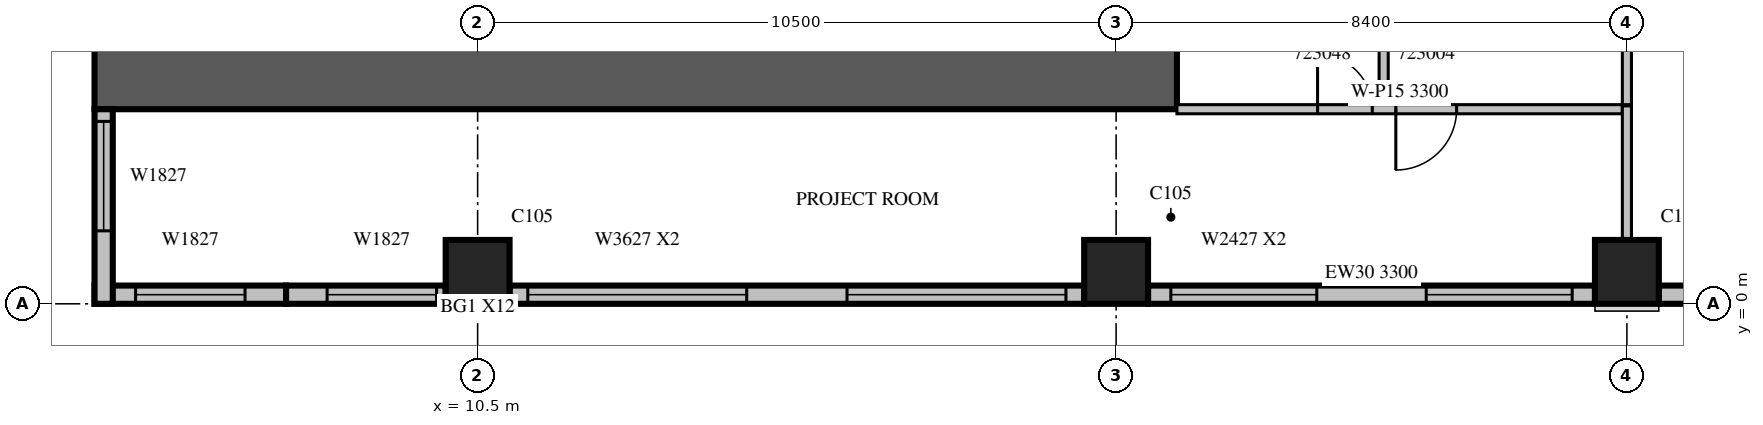
"""IFC4 building model, lengths in metres.
Left out: names, types, materials, properties, quantities, classifications, styles, units other than length and angle.
Written with IfcOpenShell. Run it as: python <this file> out.ifc"""

import sys

from ifc_helpers import new_model, si_unit, direction, frame, frame_2d, origin, origin_2d, place, context, subcontext, project, spatial, rectangle, extrude, source, transform, mapped, element, fill, save


model = new_model("IFC4")
c1 = context("Model", 3, precision=1e-05, world=origin(), true_north=direction((0.0, 1.0)))
c2 = subcontext(c1, "Body", "Model", "MODEL_VIEW")
j1 = project(units=[si_unit("LENGTHUNIT", "METRE"), si_unit("PLANEANGLEUNIT", "RADIAN")], contexts=[c1])
p1 = place(None, origin())
s1 = spatial("IfcSite", under=j1, at=p1, CompositionType="ELEMENT")
p2 = place(p1, origin())
s2 = spatial("IfcBuilding", under=s1, at=p2, CompositionType="ELEMENT")
p3 = place(p2, frame((0.0, 0.0, 107.7)))
s3 = spatial("IfcBuildingStorey", under=s2, at=p3, CompositionType="ELEMENT", Elevation=107.7)
m1 = source(origin(), c2, "Body", "SweptSolid", [
    extrude(rectangle(XDim=1.05, YDim=1.05, at=origin_2d()), origin(), (0.0, 0.0, 1.0), 4.2),
])
for number, where, z_axis, x_axis in (
    (1, (10.5, 0.525, 0.0), (0.0, 0.0, 1.0), (1.0, 0.0, 0.0)),
    (2, (21.0, 0.525, 0.0), (0.0, 0.0, 1.0), (1.0, 0.0, 0.0)),
    (3, (29.4, 0.525, 0.0), (0.0, 0.0, 1.0), (1.0, 0.0, 0.0)),
):
    element("IfcColumn", number, at=place(p3, frame(where, z_axis=z_axis, x_axis=x_axis)), inside=s3, PredefinedType="COLUMN", context=c2, shape_type="MappedRepresentation", body=[
        mapped(m1, transform((0.0, 0.0, 0.0), scale=1.0)),
    ])
m2 = source(origin(), c2, "Body", "SweptSolid", [
    extrude(rectangle(XDim=17.8, YDim=1.0, at=frame_2d((8.9, 0.0))), origin(), (0.0, 0.0, 1.0), 4.2),
])
p4 = place(p3, frame((4.2, 3.7, 0.0), z_axis=(0.0, 0.0, 1.0), x_axis=(1.0, 0.0, 0.0)))
e4 = element("IfcWall", 4, at=p4, inside=s3, PredefinedType="SHEAR", context=c2, shape_type="MappedRepresentation", body=[
    mapped(m2, transform((0.0, 0.0, 0.0), scale=1.0)),
])
m3 = source(origin(), c2, "Body", "SweptSolid", [
    extrude(rectangle(XDim=3.15, YDim=0.3, at=frame_2d((1.575, 0.0))), origin(), (0.0, 0.0, 1.0), 3.8),
])
p5 = place(p3, frame((4.2, 0.15, 0.0), z_axis=(0.0, 0.0, 1.0), x_axis=(1.0, 0.0, 0.0)))
e5 = element("IfcWall", 5, at=p5, inside=s3, PredefinedType="STANDARD", context=c2, shape_type="MappedRepresentation", body=[
    mapped(m3, transform((0.0, 0.0, 0.0), scale=1.0)),
])
m4 = source(origin(), c2, "Body", "SweptSolid", [
    extrude(rectangle(XDim=1.8, YDim=2.7, at=frame_2d((0.9, 1.35))), frame((0.0, 0.16, 0.0), z_axis=(0.0, -1.0, 0.0), x_axis=(1.0, 0.0, 0.0)), (0.0, 0.0, 1.0), 0.32),
])
p6 = place(p5, frame((0.675, 0.0, 0.6)))
e6 = element("IfcOpeningElement", 6, at=p6, cuts=e5, PredefinedType="OPENING", context=c2, shape_type="MappedRepresentation", body=[
    mapped(m4, transform((0.0, 0.0, 0.0), scale=1.0)),
])
p7 = place(p3, frame((7.35, 0.15, 0.0), z_axis=(0.0, 0.0, 1.0), x_axis=(1.0, 0.0, 0.0)))
e7 = element("IfcWall", 7, at=p7, inside=s3, PredefinedType="STANDARD", context=c2, shape_type="SweptSolid", body=[
    extrude(rectangle(XDim=2.625, YDim=0.3, at=frame_2d((1.312, 0.0))), origin(), (0.0, 0.0, 1.0), 3.8),
])
p8 = place(p7, frame((0.675, 0.0, 0.6)))
e8 = element("IfcOpeningElement", 8, at=p8, cuts=e7, PredefinedType="OPENING", context=c2, shape_type="MappedRepresentation", body=[
    mapped(m4, transform((0.0, 0.0, 0.0), scale=1.0)),
])
p9 = place(p3, frame((11.025, 0.15, 0.0), z_axis=(0.0, 0.0, 1.0), x_axis=(1.0, 0.0, 0.0)))
e9 = element("IfcWall", 9, at=p9, inside=s3, PredefinedType="STANDARD", context=c2, shape_type="SweptSolid", body=[
    extrude(rectangle(XDim=9.45, YDim=0.3, at=frame_2d((4.725, 0.0))), origin(), (0.0, 0.0, 1.0), 3.8),
])
m5 = source(origin(), c2, "Body", "SweptSolid", [
    extrude(rectangle(XDim=3.6, YDim=2.7, at=frame_2d((1.8, 1.35))), frame((0.0, 0.16, 0.0), z_axis=(0.0, -1.0, 0.0), x_axis=(1.0, 0.0, 0.0)), (0.0, 0.0, 1.0), 0.32),
])
p10 = place(p9, frame((0.3, 0.0, 0.6)))
e10 = element("IfcOpeningElement", 10, at=p10, cuts=e9, PredefinedType="OPENING", context=c2, shape_type="MappedRepresentation", body=[
    mapped(m5, transform((0.0, 0.0, 0.0), scale=1.0)),
])
p11 = place(p9, frame((5.55, 0.0, 0.6)))
e11 = element("IfcOpeningElement", 11, at=p11, cuts=e9, PredefinedType="OPENING", context=c2, shape_type="MappedRepresentation", body=[
    mapped(m5, transform((0.0, 0.0, 0.0), scale=1.0)),
])
m6 = source(origin(), c2, "Body", "SweptSolid", [
    extrude(rectangle(XDim=7.35, YDim=0.3, at=frame_2d((3.675, 0.0))), origin(), (0.0, 0.0, 1.0), 3.3),
])
p12 = place(p3, frame((21.525, 0.15, 0.0), z_axis=(0.0, 0.0, 1.0), x_axis=(1.0, 0.0, 0.0)))
e12 = element("IfcWall", 12, at=p12, inside=s3, PredefinedType="STANDARD", context=c2, shape_type="MappedRepresentation", body=[
    mapped(m6, transform((0.0, 0.0, 0.0), scale=1.0)),
])
m7 = source(origin(), c2, "Body", "SweptSolid", [
    extrude(rectangle(XDim=2.4, YDim=2.7, at=frame_2d((1.2, 1.35))), frame((0.0, 0.16, 0.0), z_axis=(0.0, -1.0, 0.0), x_axis=(1.0, 0.0, 0.0)), (0.0, 0.0, 1.0), 0.32),
])
p13 = place(p12, frame((0.375, 0.0, 0.6)))
e13 = element("IfcOpeningElement", 13, at=p13, cuts=e12, PredefinedType="OPENING", context=c2, shape_type="MappedRepresentation", body=[
    mapped(m7, transform((0.0, 0.0, 0.0), scale=1.0)),
])
p14 = place(p12, frame((4.575, 0.0, 0.6)))
e14 = element("IfcOpeningElement", 14, at=p14, cuts=e12, PredefinedType="OPENING", context=c2, shape_type="MappedRepresentation", body=[
    mapped(m7, transform((0.0, 0.0, 0.0), scale=1.0)),
])
m8 = source(origin(), c2, "Body", "SweptSolid", [
    extrude(rectangle(XDim=7.35, YDim=0.3, at=frame_2d((3.675, 0.0))), origin(), (0.0, 0.0, 1.0), 3.8),
])
p15 = place(p3, frame((29.925, 0.15, 0.0), z_axis=(0.0, 0.0, 1.0), x_axis=(1.0, 0.0, 0.0)))
e15 = element("IfcWall", 15, at=p15, inside=s3, PredefinedType="STANDARD", context=c2, shape_type="MappedRepresentation", body=[
    mapped(m8, transform((0.0, 0.0, 0.0), scale=1.0)),
])
m9 = source(origin(), c2, "Body", "SweptSolid", [
    extrude(rectangle(XDim=3.2, YDim=0.3, at=frame_2d((1.6, 0.0))), origin(), (0.0, 0.0, 1.0), 3.8),
])
p16 = place(p3, frame((4.35, 3.2, 0.0), z_axis=(0.0, 0.0, 1.0), x_axis=(0.0, -1.0, 0.0)))
e16 = element("IfcWall", 16, at=p16, inside=s3, PredefinedType="STANDARD", context=c2, shape_type="MappedRepresentation", body=[
    mapped(m9, transform((0.0, 0.0, 0.0), scale=1.0)),
])
p17 = place(p16, frame((0.2, 0.0, 0.6)))
e17 = element("IfcOpeningElement", 17, at=p17, cuts=e16, PredefinedType="OPENING", context=c2, shape_type="MappedRepresentation", body=[
    mapped(m4, transform((0.0, 0.0, 0.0), scale=1.0)),
])
p18 = place(p3, frame((25.4, 14.7, 0.0), z_axis=(0.0, 0.0, 1.0), x_axis=(0.0, -1.0, 0.0)))
e18 = element("IfcWall", 18, at=p18, inside=s3, PredefinedType="PARTITIONING", context=c2, shape_type="SweptSolid", body=[
    extrude(rectangle(XDim=11.425, YDim=0.15, at=frame_2d((5.713, 0.0))), origin(), (0.0, 0.0, 1.0), 2.8),
])
m10 = source(origin(), c2, "Body", "SweptSolid", [
    extrude(rectangle(XDim=0.9, YDim=2.1, at=frame_2d((0.45, 1.05))), frame((0.0, 0.085, 0.0), z_axis=(0.0, -1.0, 0.0), x_axis=(1.0, 0.0, 0.0)), (0.0, 0.0, 1.0), 0.17),
])
p19 = place(p18, frame((6.763, 0.0, 0.0)))
e19 = element("IfcOpeningElement", 19, at=p19, cuts=e18, PredefinedType="OPENING", context=c2, shape_type="MappedRepresentation", body=[
    mapped(m10, transform((0.0, 0.0, 0.0), scale=1.0)),
])
p20 = place(p18, frame((0.175, 0.0, 0.0)))
e20 = element("IfcOpeningElement", 20, at=p20, cuts=e18, PredefinedType="OPENING", context=c2, shape_type="MappedRepresentation", body=[
    mapped(m10, transform((0.0, 0.0, 0.0), scale=1.0)),
])
p21 = place(p3, frame((29.4, 3.275, 0.0), z_axis=(0.0, 0.0, 1.0), x_axis=(0.0, 1.0, 0.0)))
e21 = element("IfcWall", 21, at=p21, inside=s3, PredefinedType="PARTITIONING", context=c2, shape_type="SweptSolid", body=[
    extrude(rectangle(XDim=6.701, YDim=0.15, at=frame_2d((3.35, 0.0))), origin(), (0.0, 0.0, 1.0), 3.8),
])
p22 = place(p3, frame((22.0, 3.2, 0.0), z_axis=(0.0, 0.0, 1.0), x_axis=(1.0, 0.0, 0.0)))
e22 = element("IfcWall", 22, at=p22, inside=s3, PredefinedType="PARTITIONING", context=c2, shape_type="SweptSolid", body=[
    extrude(rectangle(XDim=7.325, YDim=0.15, at=frame_2d((3.663, 0.0))), origin(), (0.0, 0.0, 1.0), 3.3),
])
m11 = source(origin(), c2, "Body", "SweptSolid", [
    extrude(rectangle(XDim=1.0, YDim=2.1, at=frame_2d((0.5, 1.05))), frame((0.0, 0.085, 0.0), z_axis=(0.0, -1.0, 0.0), x_axis=(1.0, 0.0, 0.0)), (0.0, 0.0, 1.0), 0.17),
])
p23 = place(p22, frame((3.6, 0.0, 0.0)))
e23 = element("IfcOpeningElement", 23, at=p23, cuts=e22, PredefinedType="OPENING", context=c2, shape_type="MappedRepresentation", body=[
    mapped(m11, transform((0.0, 0.0, 0.0), scale=1.0)),
])
p24 = place(p22, frame((2.313, 0.0, 0.0)))
e24 = element("IfcOpeningElement", 24, at=p24, cuts=e22, PredefinedType="OPENING", context=c2, shape_type="MappedRepresentation", body=[
    mapped(m10, transform((0.0, 0.0, 0.0), scale=1.0)),
])
p25 = place(p3, frame((29.4, 1.049, 0.0), z_axis=(0.0, 0.0, 1.0), x_axis=(0.0, 1.0, 0.0)))
e25 = element("IfcWall", 25, at=p25, inside=s3, PredefinedType="PARTITIONING", context=c2, shape_type="SweptSolid", body=[
    extrude(rectangle(XDim=2.206, YDim=0.15, at=frame_2d((1.103, 0.0))), origin(), (0.0, 0.0, 1.0), 3.8),
])
m12 = source(origin(), c2, "Body", "SweptSolid", [
    extrude(rectangle(XDim=1.8, YDim=2.7, at=frame_2d((0.9, 1.35))), frame((0.0, 0.03, 0.0), z_axis=(0.0, -1.0, 0.0), x_axis=(1.0, 0.0, 0.0)), (0.0, 0.0, 1.0), 0.06),
])
p26 = place(p6, origin())
e26 = element("IfcWindow", 26, at=p26, inside=s3, PartitioningType="SINGLE_PANEL", PredefinedType="WINDOW", context=c2, shape_type="MappedRepresentation", body=[
    mapped(m12, transform((0.0, 0.0, 0.0), scale=1.0)),
])
fill(e6, e26)
p27 = place(p8, origin())
e27 = element("IfcWindow", 27, at=p27, inside=s3, PartitioningType="SINGLE_PANEL", PredefinedType="WINDOW", context=c2, shape_type="MappedRepresentation", body=[
    mapped(m12, transform((0.0, 0.0, 0.0), scale=1.0)),
])
fill(e8, e27)
m13 = source(origin(), c2, "Body", "SweptSolid", [
    extrude(rectangle(XDim=3.6, YDim=2.7, at=frame_2d((1.8, 1.35))), frame((0.0, 0.03, 0.0), z_axis=(0.0, -1.0, 0.0), x_axis=(1.0, 0.0, 0.0)), (0.0, 0.0, 1.0), 0.06),
])
p28 = place(p10, origin())
e28 = element("IfcWindow", 28, at=p28, inside=s3, PartitioningType="SINGLE_PANEL", PredefinedType="WINDOW", context=c2, shape_type="MappedRepresentation", body=[
    mapped(m13, transform((0.0, 0.0, 0.0), scale=1.0)),
])
fill(e10, e28)
p29 = place(p11, origin())
e29 = element("IfcWindow", 29, at=p29, inside=s3, PartitioningType="SINGLE_PANEL", PredefinedType="WINDOW", context=c2, shape_type="MappedRepresentation", body=[
    mapped(m13, transform((0.0, 0.0, 0.0), scale=1.0)),
])
fill(e11, e29)
m14 = source(origin(), c2, "Body", "SweptSolid", [
    extrude(rectangle(XDim=2.4, YDim=2.7, at=frame_2d((1.2, 1.35))), frame((0.0, 0.03, 0.0), z_axis=(0.0, -1.0, 0.0), x_axis=(1.0, 0.0, 0.0)), (0.0, 0.0, 1.0), 0.06),
])
p30 = place(p13, origin())
e30 = element("IfcWindow", 30, at=p30, inside=s3, PartitioningType="SINGLE_PANEL", PredefinedType="WINDOW", context=c2, shape_type="MappedRepresentation", body=[
    mapped(m14, transform((0.0, 0.0, 0.0), scale=1.0)),
])
fill(e13, e30)
p31 = place(p14, origin())
e31 = element("IfcWindow", 31, at=p31, inside=s3, PartitioningType="SINGLE_PANEL", PredefinedType="WINDOW", context=c2, shape_type="MappedRepresentation", body=[
    mapped(m14, transform((0.0, 0.0, 0.0), scale=1.0)),
])
fill(e14, e31)
p32 = place(p17, origin())
e32 = element("IfcWindow", 32, at=p32, inside=s3, PartitioningType="SINGLE_PANEL", PredefinedType="WINDOW", context=c2, shape_type="MappedRepresentation", body=[
    mapped(m12, transform((0.0, 0.0, 0.0), scale=1.0)),
])
fill(e17, e32)
m15 = source(origin(), c2, "Body", "SweptSolid", [
    extrude(rectangle(XDim=1.0, YDim=2.1, at=frame_2d((0.5, 1.05))), frame((0.0, 0.025, 0.0), z_axis=(0.0, -1.0, 0.0), x_axis=(1.0, 0.0, 0.0)), (0.0, 0.0, 1.0), 0.05),
])
p33 = place(p23, origin())
e33 = element("IfcDoor", 33, at=p33, inside=s3, OperationType="SINGLE_SWING_RIGHT", PredefinedType="DOOR", context=c2, shape_type="MappedRepresentation", body=[
    mapped(m15, transform((0.0, 0.0, 0.0), scale=1.0)),
])
fill(e23, e33)
m16 = source(origin(), c2, "Body", "SweptSolid", [
    extrude(rectangle(XDim=0.9, YDim=2.1, at=frame_2d((0.45, 1.05))), frame((0.0, 0.025, 0.0), z_axis=(0.0, -1.0, 0.0), x_axis=(1.0, 0.0, 0.0)), (0.0, 0.0, 1.0), 0.05),
])
p34 = place(p24, origin())
e34 = element("IfcDoor", 34, at=p34, inside=s3, OperationType="SINGLE_SWING_LEFT", PredefinedType="DOOR", context=c2, shape_type="MappedRepresentation", body=[
    mapped(m16, transform((0.0, 0.0, 0.0), scale=1.0)),
])
fill(e24, e34)
save(model, sys.argv[1])
